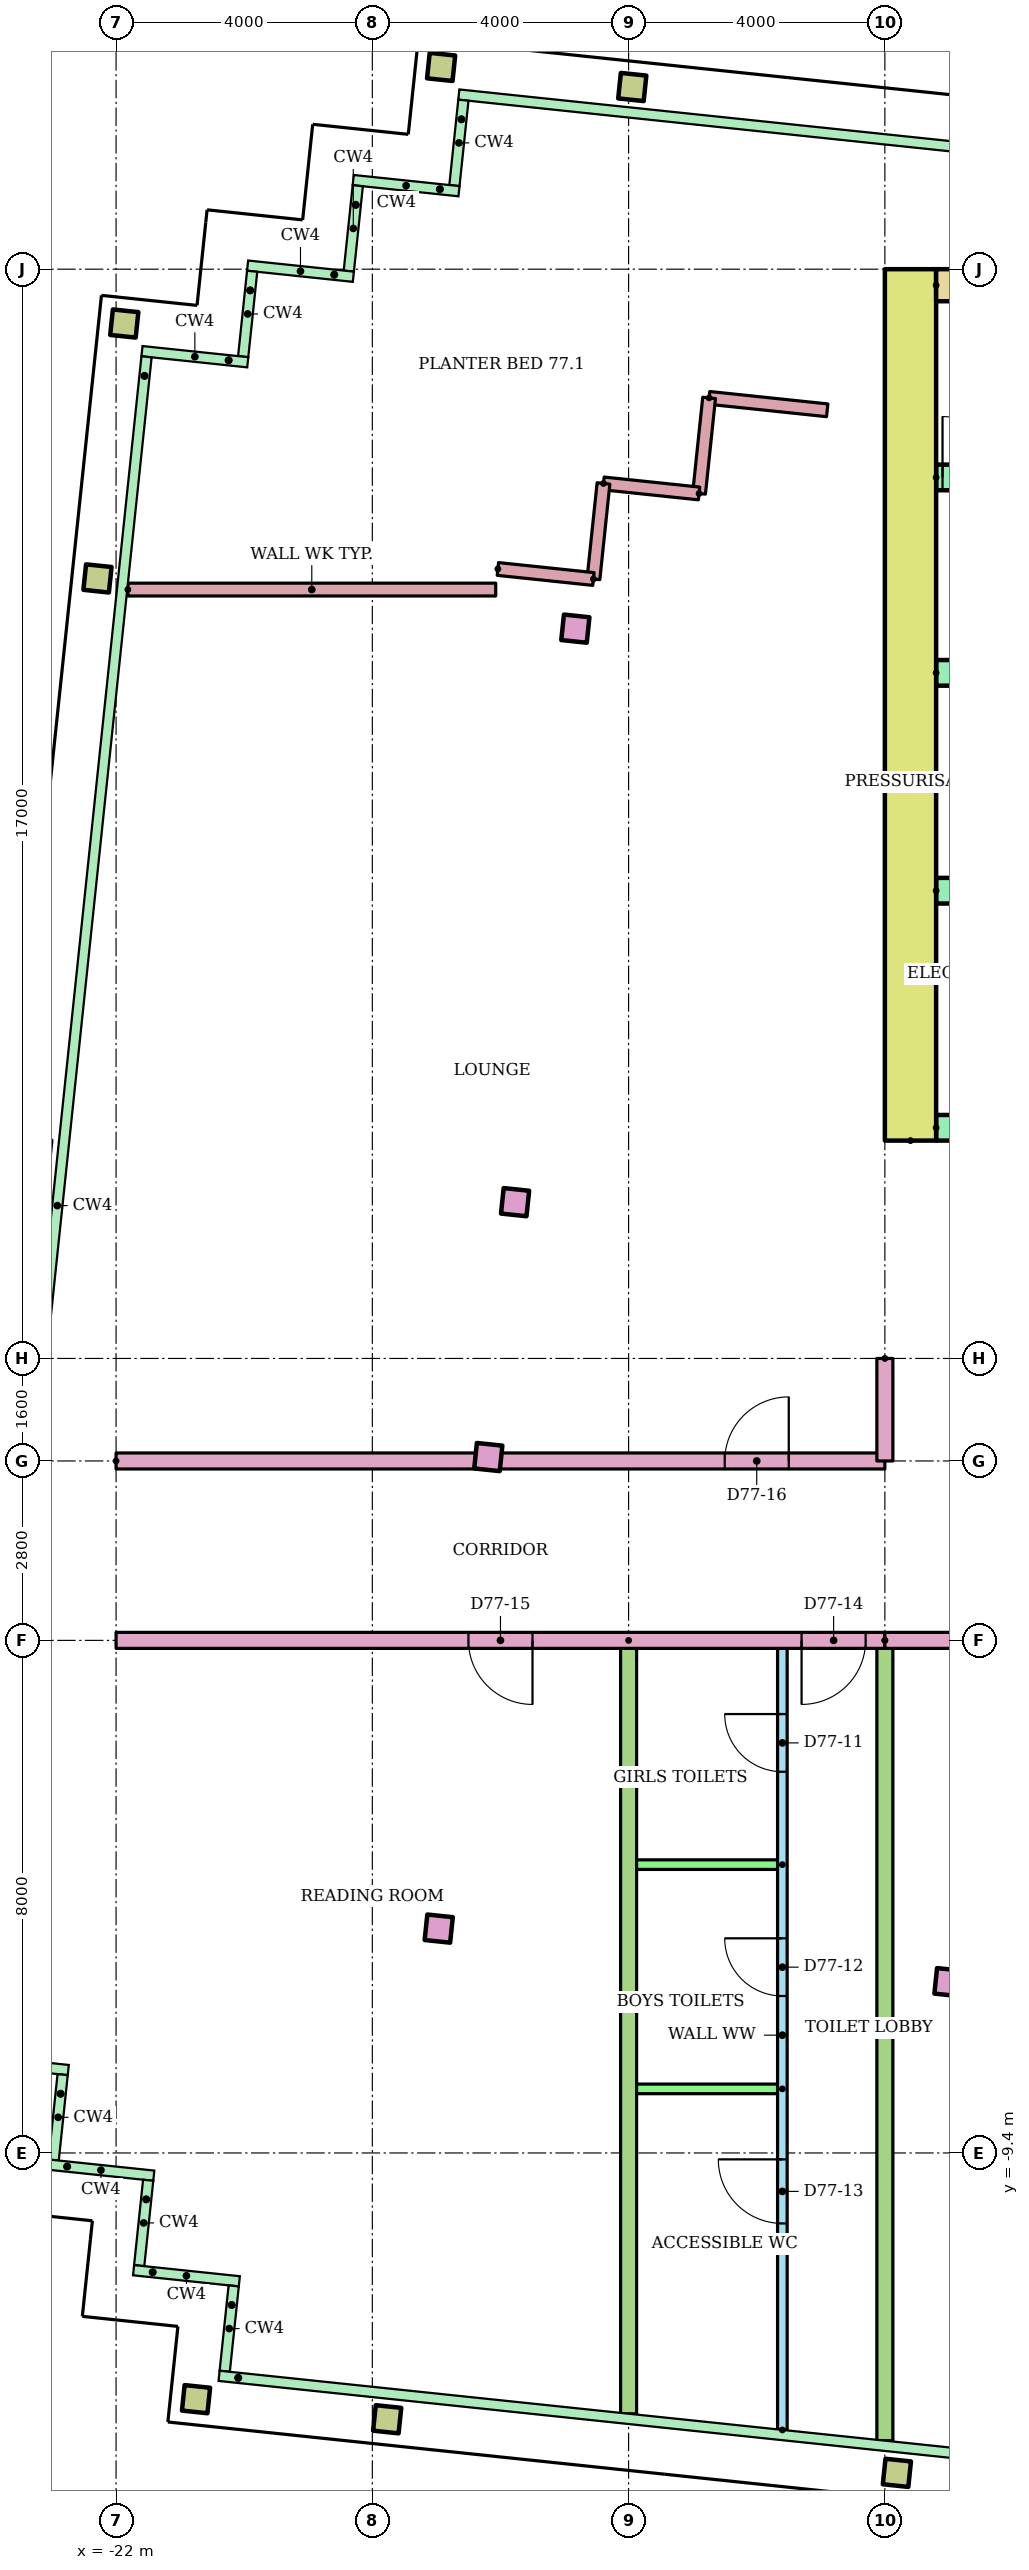
"""IFC4 building model, lengths in metres.
Left out: names, types, materials, properties, quantities, classifications, styles, units other than length and angle.
Written with IfcOpenShell. Run it as: python <this file> out.ifc"""

import sys

from ifc_helpers import new_model, si_unit, direction, frame, frame_2d, origin, origin_2d, place, context, subcontext, project, spatial, rectangle, hollow_rectangle, extrude, element, fill, save


model = new_model("IFC4")
c1 = context("Model", 3, precision=1e-05, world=origin(), true_north=direction((0.0, 1.0)))
c2 = subcontext(c1, "Body", "Model", "MODEL_VIEW")
j1 = project(units=[si_unit("LENGTHUNIT", "METRE"), si_unit("PLANEANGLEUNIT", "RADIAN")], contexts=[c1])
p1 = place(None, origin())
s1 = spatial("IfcSite", under=j1, at=p1, CompositionType="ELEMENT")
p2 = place(p1, origin())
s2 = spatial("IfcBuilding", under=s1, at=p2, CompositionType="ELEMENT")
p3 = place(p2, frame((0.0, 0.0, 298.3)))
s3 = spatial("IfcBuildingStorey", under=s2, at=p3, CompositionType="ELEMENT", Elevation=298.3)
for number, where, z_axis, x_axis in (
    (1, (-20.752, -13.243, 0.0), (0.0, 0.0, 1.0), (0.995, -0.105, 0.0)),
    (2, (-17.768, -13.556, 0.0), (0.0, 0.0, 1.0), (0.995, -0.105, 0.0)),
    (3, (-9.812, -14.392, 0.0), (0.0, 0.0, 1.0), (0.995, -0.105, 0.0)),
):
    element("IfcColumn", number, at=place(p3, frame(where, z_axis=z_axis, x_axis=x_axis)), inside=s3, PredefinedType="COLUMN", context=c2, shape_type="SweptSolid", body=[
        extrude(hollow_rectangle(XDim=0.4, YDim=0.4, WallThickness=0.02, at=origin_2d()), origin(), (0.0, 0.0, 1.0), 3.4),
    ])
for number, where, z_axis, x_axis in (
    (4, (-16.964, -5.898, 0.0), (0.0, 0.0, 1.0), (0.995, -0.105, 0.0)),
    (5, (-9.007, -6.735, 0.0), (0.0, 0.0, 1.0), (0.995, -0.105, 0.0)),
    (6, (-16.19, 1.461, 0.0), (0.0, 0.0, 1.0), (0.995, -0.105, 0.0)),
    (7, (-15.772, 5.439, 0.0), (0.0, 0.0, 1.0), (0.995, -0.105, 0.0)),
):
    element("IfcColumn", number, at=place(p3, frame(where, z_axis=z_axis, x_axis=x_axis)), inside=s3, PredefinedType="COLUMN", context=c2, shape_type="SweptSolid", body=[
        extrude(rectangle(XDim=0.4, YDim=0.4, at=origin_2d()), origin(), (0.0, 0.0, 1.0), 3.4),
    ])
p4 = place(p3, frame((-22.29, 15.174, 0.0), z_axis=(0.0, 0.0, 1.0), x_axis=(0.994521895368, -0.104528463268, 0.0)))
e8 = element("IfcColumn", 8, at=p4, inside=s3, PredefinedType="COLUMN", context=c2, shape_type="SweptSolid", body=[
    extrude(hollow_rectangle(XDim=0.4, YDim=0.4, WallThickness=0.02, at=origin_2d()), origin(), (0.0, 0.0, 1.0), 3.4),
])
p5 = place(p3, frame((-14.831, 14.39, 0.0), z_axis=(0.0, 0.0, 1.0), x_axis=(0.994521895368, -0.104528463268, 0.0)))
e9 = element("IfcColumn", 9, at=p5, inside=s3, PredefinedType="COLUMN", context=c2, shape_type="SweptSolid", body=[
    extrude(rectangle(XDim=0.4, YDim=0.4, at=origin_2d()), origin(), (0.0, 0.0, 1.0), 3.4),
])
for number, where, z_axis, x_axis in (
    (10, (-21.872, 19.152, 0.0), (0.0, 0.0, 1.0), (0.995, -0.105, 0.0)),
    (11, (-16.926, 23.157, 0.0), (0.0, 0.0, 1.0), (0.995, -0.105, 0.0)),
    (12, (-13.943, 22.843, 0.0), (0.0, 0.0, 1.0), (0.995, -0.105, 0.0)),
):
    element("IfcColumn", number, at=place(p3, frame(where, z_axis=z_axis, x_axis=x_axis)), inside=s3, PredefinedType="COLUMN", context=c2, shape_type="SweptSolid", body=[
        extrude(hollow_rectangle(XDim=0.4, YDim=0.4, WallThickness=0.02, at=origin_2d()), origin(), (0.0, 0.0, 1.0), 3.4),
    ])
p6 = place(p3, frame((-9.6, 6.4, 0.0), z_axis=(0.0, 0.0, 1.0), x_axis=(0.0, 1.0, 0.0)))
e13 = element("IfcWall", 13, at=p6, inside=s3, PredefinedType="SHEAR", context=c2, shape_type="SweptSolid", body=[
    extrude(rectangle(XDim=13.6, YDim=0.8, at=frame_2d((6.8, 0.0))), origin(), (0.0, 0.0, 1.0), 2.9),
])
p7 = place(p3, frame((-9.2, 19.75, 0.0)))
e14 = element("IfcWall", 14, at=p7, inside=s3, PredefinedType="SHEAR", context=c2, shape_type="SweptSolid", body=[
    extrude(rectangle(XDim=18.4, YDim=0.5, at=frame_2d((9.2, 0.0))), origin(), (0.0, 0.0, 1.0), 2.9),
])
p8 = place(p3, frame((-9.2, 6.6, 0.0)))
e15 = element("IfcWall", 15, at=p8, inside=s3, PredefinedType="SHEAR", context=c2, shape_type="SweptSolid", body=[
    extrude(rectangle(XDim=18.4, YDim=0.4, at=frame_2d((9.2, 0.0))), origin(), (0.0, 0.0, 1.0), 2.9),
])
p9 = place(p8, frame((8.3, 0.0, 0.0)))
e16 = element("IfcOpeningElement", 16, at=p9, cuts=e15, PredefinedType="OPENING", context=c2, shape_type="SweptSolid", body=[
    extrude(rectangle(XDim=1.8, YDim=2.1, at=frame_2d((0.9, 1.05))), frame((0.0, 0.21, 0.0), z_axis=(0.0, -1.0, 0.0), x_axis=(1.0, 0.0, 0.0)), (0.0, 0.0, 1.0), 0.42),
])
p10 = place(p8, frame((3.8, 0.0, 0.0)))
e17 = element("IfcOpeningElement", 17, at=p10, cuts=e15, PredefinedType="OPENING", context=c2, shape_type="SweptSolid", body=[
    extrude(rectangle(XDim=1.8, YDim=2.1, at=frame_2d((0.9, 1.05))), frame((0.0, 0.21, 0.0), z_axis=(0.0, -1.0, 0.0), x_axis=(1.0, 0.0, 0.0)), (0.0, 0.0, 1.0), 0.42),
])
p11 = place(p8, frame((12.8, 0.0, 0.0)))
e18 = element("IfcOpeningElement", 18, at=p11, cuts=e15, PredefinedType="OPENING", context=c2, shape_type="SweptSolid", body=[
    extrude(rectangle(XDim=1.8, YDim=2.1, at=frame_2d((0.9, 1.05))), frame((0.0, 0.21, 0.0), z_axis=(0.0, -1.0, 0.0), x_axis=(1.0, 0.0, 0.0)), (0.0, 0.0, 1.0), 0.42),
])
p12 = place(p3, frame((-9.2, 10.3, 0.0)))
e19 = element("IfcWall", 19, at=p12, inside=s3, PredefinedType="SHEAR", context=c2, shape_type="SweptSolid", body=[
    extrude(rectangle(XDim=8.0, YDim=0.4, at=frame_2d((4.0, 0.0))), origin(), (0.0, 0.0, 1.0), 2.9),
])
p13 = place(p12, frame((3.35, 0.0, 0.0)))
e20 = element("IfcOpeningElement", 20, at=p13, cuts=e19, PredefinedType="OPENING", context=c2, shape_type="SweptSolid", body=[
    extrude(rectangle(XDim=1.1, YDim=2.1, at=frame_2d((0.55, 1.05))), frame((0.0, 0.21, 0.0), z_axis=(0.0, -1.0, 0.0), x_axis=(1.0, 0.0, 0.0)), (0.0, 0.0, 1.0), 0.42),
])
p14 = place(p12, frame((6.083, 0.0, 0.0)))
e21 = element("IfcOpeningElement", 21, at=p14, cuts=e19, PredefinedType="OPENING", context=c2, shape_type="SweptSolid", body=[
    extrude(rectangle(XDim=1.1, YDim=2.1, at=frame_2d((0.55, 1.05))), frame((0.0, 0.21, 0.0), z_axis=(0.0, -1.0, 0.0), x_axis=(1.0, 0.0, 0.0)), (0.0, 0.0, 1.0), 0.42),
])
p15 = place(p12, frame((0.917, 0.0, 0.0)))
e22 = element("IfcOpeningElement", 22, at=p15, cuts=e19, PredefinedType="OPENING", context=c2, shape_type="SweptSolid", body=[
    extrude(rectangle(XDim=1.0, YDim=2.1, at=frame_2d((0.5, 1.05))), frame((0.0, 0.21, 0.0), z_axis=(0.0, -1.0, 0.0), x_axis=(1.0, 0.0, 0.0)), (0.0, 0.0, 1.0), 0.42),
])
p16 = place(p3, frame((-9.2, 13.7, 0.0)))
e23 = element("IfcWall", 23, at=p16, inside=s3, PredefinedType="SHEAR", context=c2, shape_type="SweptSolid", body=[
    extrude(rectangle(XDim=8.0, YDim=0.4, at=frame_2d((4.0, 0.0))), origin(), (0.0, 0.0, 1.0), 2.9),
])
p17 = place(p3, frame((-9.2, 16.75, 0.0)))
e24 = element("IfcWall", 24, at=p17, inside=s3, PredefinedType="SHEAR", context=c2, shape_type="SweptSolid", body=[
    extrude(rectangle(XDim=18.4, YDim=0.4, at=frame_2d((9.2, 0.0))), origin(), (0.0, 0.0, 1.0), 2.9),
])
p18 = place(p17, frame((0.1, 0.0, 0.0)))
e25 = element("IfcOpeningElement", 25, at=p18, cuts=e24, PredefinedType="OPENING", context=c2, shape_type="SweptSolid", body=[
    extrude(rectangle(XDim=0.95, YDim=2.1, at=frame_2d((0.475, 1.05))), frame((0.0, 0.21, 0.0), z_axis=(0.0, -1.0, 0.0), x_axis=(1.0, 0.0, 0.0)), (0.0, 0.0, 1.0), 0.42),
])
p19 = place(p17, frame((6.1, 0.0, 0.0)))
e26 = element("IfcOpeningElement", 26, at=p19, cuts=e24, PredefinedType="OPENING", context=c2, shape_type="SweptSolid", body=[
    extrude(rectangle(XDim=0.95, YDim=2.1, at=frame_2d((0.475, 1.05))), frame((0.0, 0.21, 0.0), z_axis=(0.0, -1.0, 0.0), x_axis=(1.0, 0.0, 0.0)), (0.0, 0.0, 1.0), 0.42),
])
p20 = place(p17, frame((12.1, 0.0, 0.0)))
e27 = element("IfcOpeningElement", 27, at=p20, cuts=e24, PredefinedType="OPENING", context=c2, shape_type="SweptSolid", body=[
    extrude(rectangle(XDim=0.95, YDim=2.1, at=frame_2d((0.475, 1.05))), frame((0.0, 0.21, 0.0), z_axis=(0.0, -1.0, 0.0), x_axis=(1.0, 0.0, 0.0)), (0.0, 0.0, 1.0), 0.42),
])
p21 = place(p3, frame((-10.0, -1.4, 0.0), z_axis=(0.0, 0.0, 1.0), x_axis=(-1.0, 0.0, 0.0)))
e28 = element("IfcWall", 28, at=p21, inside=s3, PredefinedType="PARTITIONING", context=c2, shape_type="SweptSolid", body=[
    extrude(rectangle(XDim=12.0, YDim=0.25, at=frame_2d((6.0, 0.0))), origin(), (0.0, 0.0, 1.0), 2.6),
])
p22 = place(p21, frame((0.3, 0.0, 0.0)))
e29 = element("IfcOpeningElement", 29, at=p22, cuts=e28, PredefinedType="OPENING", context=c2, shape_type="SweptSolid", body=[
    extrude(rectangle(XDim=1.0, YDim=2.1, at=frame_2d((0.5, 1.05))), frame((0.0, 0.135, 0.0), z_axis=(0.0, -1.0, 0.0), x_axis=(1.0, 0.0, 0.0)), (0.0, 0.0, 1.0), 0.27),
])
p23 = place(p21, frame((5.5, 0.0, 0.0)))
e30 = element("IfcOpeningElement", 30, at=p23, cuts=e28, PredefinedType="OPENING", context=c2, shape_type="SweptSolid", body=[
    extrude(rectangle(XDim=1.0, YDim=2.1, at=frame_2d((0.5, 1.05))), frame((0.0, 0.135, 0.0), z_axis=(0.0, -1.0, 0.0), x_axis=(1.0, 0.0, 0.0)), (0.0, 0.0, 1.0), 0.27),
])
p24 = place(p3, frame((-11.6, -13.723, 0.0), z_axis=(0.0, 0.0, 1.0), x_axis=(0.0, 1.0, 0.0)))
e31 = element("IfcWall", 31, at=p24, inside=s3, PredefinedType="PARTITIONING", context=c2, shape_type="SweptSolid", body=[
    extrude(rectangle(XDim=12.323, YDim=0.15, at=frame_2d((6.162, 0.0))), origin(), (0.0, 0.0, 1.0), 2.6),
])
p25 = place(p24, frame((10.273, 0.0, 0.0)))
e32 = element("IfcOpeningElement", 32, at=p25, cuts=e31, PredefinedType="OPENING", context=c2, shape_type="SweptSolid", body=[
    extrude(rectangle(XDim=0.9, YDim=2.1, at=frame_2d((0.45, 1.05))), frame((0.0, 0.085, 0.0), z_axis=(0.0, -1.0, 0.0), x_axis=(1.0, 0.0, 0.0)), (0.0, 0.0, 1.0), 0.17),
])
p26 = place(p24, frame((6.773, 0.0, 0.0)))
e33 = element("IfcOpeningElement", 33, at=p26, cuts=e31, PredefinedType="OPENING", context=c2, shape_type="SweptSolid", body=[
    extrude(rectangle(XDim=0.9, YDim=2.1, at=frame_2d((0.45, 1.05))), frame((0.0, 0.085, 0.0), z_axis=(0.0, -1.0, 0.0), x_axis=(1.0, 0.0, 0.0)), (0.0, 0.0, 1.0), 0.17),
])
p27 = place(p24, frame((3.223, 0.0, 0.0)))
e34 = element("IfcOpeningElement", 34, at=p27, cuts=e31, PredefinedType="OPENING", context=c2, shape_type="SweptSolid", body=[
    extrude(rectangle(XDim=1.0, YDim=2.1, at=frame_2d((0.5, 1.05))), frame((0.0, 0.085, 0.0), z_axis=(0.0, -1.0, 0.0), x_axis=(1.0, 0.0, 0.0)), (0.0, 0.0, 1.0), 0.17),
])
for number, where, z_axis, x_axis in (
    (35, (-11.6, -4.9, 0.0), (0.0, 0.0, 1.0), (-1.0, 0.0, 0.0)),
    (36, (-11.6, -8.4, 0.0), (0.0, 0.0, 1.0), (-1.0, 0.0, 0.0)),
):
    element("IfcWall", number, at=place(p3, frame(where, z_axis=z_axis, x_axis=x_axis)), inside=s3, PredefinedType="PARTITIONING", context=c2, shape_type="SweptSolid", body=[
        extrude(rectangle(XDim=2.4, YDim=0.15, at=frame_2d((1.2, 0.0))), origin(), (0.0, 0.0, 1.0), 2.6),
    ])
p28 = place(p3, frame((-14.0, -1.4, 0.0), z_axis=(0.0, 0.0, 1.0), x_axis=(0.0, -1.0, 0.0)))
e37 = element("IfcWall", 37, at=p28, inside=s3, PredefinedType="PARTITIONING", context=c2, shape_type="SweptSolid", body=[
    extrude(rectangle(XDim=12.071, YDim=0.25, at=frame_2d((6.035, 0.0))), origin(), (0.0, 0.0, 1.0), 2.6),
])
p29 = place(p3, frame((-10.0, -1.4, 0.0), z_axis=(0.0, 0.0, 1.0), x_axis=(0.0, -1.0, 0.0)))
e38 = element("IfcWall", 38, at=p29, inside=s3, PredefinedType="PARTITIONING", context=c2, shape_type="SweptSolid", body=[
    extrude(rectangle(XDim=12.491, YDim=0.25, at=frame_2d((6.246, 0.0))), origin(), (0.0, 0.0, 1.0), 2.6),
])
p30 = place(p3, frame((-22.0, 1.4, 0.0)))
e39 = element("IfcWall", 39, at=p30, inside=s3, PredefinedType="PARTITIONING", context=c2, shape_type="SweptSolid", body=[
    extrude(rectangle(XDim=12.0, YDim=0.25, at=frame_2d((6.0, 0.0))), origin(), (0.0, 0.0, 1.0), 2.6),
])
p31 = place(p30, frame((9.5, 0.0, 0.0)))
e40 = element("IfcOpeningElement", 40, at=p31, cuts=e39, PredefinedType="OPENING", context=c2, shape_type="SweptSolid", body=[
    extrude(rectangle(XDim=1.0, YDim=2.1, at=frame_2d((0.5, 1.05))), frame((0.0, 0.135, 0.0), z_axis=(0.0, -1.0, 0.0), x_axis=(1.0, 0.0, 0.0)), (0.0, 0.0, 1.0), 0.27),
])
p32 = place(p3, frame((10.0, -1.4, 0.0), z_axis=(0.0, 0.0, 1.0), x_axis=(-1.0, 0.0, 0.0)))
e41 = element("IfcWall", 41, at=p32, inside=s3, PredefinedType="PARTITIONING", context=c2, shape_type="SweptSolid", body=[
    extrude(rectangle(XDim=20.0, YDim=0.25, at=frame_2d((10.0, 0.0))), origin(), (0.0, 0.0, 1.0), 2.6),
])
p33 = place(p32, frame((13.5, 0.0, 0.0)))
e42 = element("IfcOpeningElement", 42, at=p33, cuts=e41, PredefinedType="OPENING", context=c2, shape_type="SweptSolid", body=[
    extrude(rectangle(XDim=1.0, YDim=2.1, at=frame_2d((0.5, 1.05))), frame((0.0, 0.135, 0.0), z_axis=(0.0, -1.0, 0.0), x_axis=(1.0, 0.0, 0.0)), (0.0, 0.0, 1.0), 0.27),
])
p34 = place(p32, frame((0.988, 0.0, 0.0)))
e43 = element("IfcOpeningElement", 43, at=p34, cuts=e41, PredefinedType="OPENING", context=c2, shape_type="SweptSolid", body=[
    extrude(rectangle(XDim=1.0, YDim=2.1, at=frame_2d((0.5, 1.05))), frame((0.0, 0.135, 0.0), z_axis=(0.0, -1.0, 0.0), x_axis=(1.0, 0.0, 0.0)), (0.0, 0.0, 1.0), 0.27),
])
p35 = place(p3, frame((-10.0, 3.0, 0.0), z_axis=(0.0, 0.0, 1.0), x_axis=(0.0, -1.0, 0.0)))
e44 = element("IfcWall", 44, at=p35, inside=s3, PredefinedType="PARTITIONING", context=c2, shape_type="SweptSolid", body=[
    extrude(rectangle(XDim=1.6, YDim=0.25, at=frame_2d((0.8, 0.0))), origin(), (0.0, 0.0, 1.0), 2.6),
])
p36 = place(p3, frame((-12.743, 17.991, 0.0), z_axis=(0.0, 0.0, 1.0), x_axis=(0.994516993757, -0.104575088471, 0.0)))
e45 = element("IfcWall", 45, at=p36, inside=s3, PredefinedType="PARTITIONING", context=c2, shape_type="SweptSolid", body=[
    extrude(rectangle(XDim=1.854, YDim=0.2, at=frame_2d((0.927, 0.0))), origin(), (0.0, 0.0, 1.0), 0.9),
])
p37 = place(p3, frame((-12.9, 16.5, 0.0), z_axis=(0.0, 0.0, 1.0), x_axis=(0.104481464157, 0.994526834051, 0.0)))
e46 = element("IfcWall", 46, at=p37, inside=s3, PredefinedType="PARTITIONING", context=c2, shape_type="SweptSolid", body=[
    extrude(rectangle(XDim=1.5, YDim=0.2, at=frame_2d((0.75, 0.0))), origin(), (0.0, 0.0, 1.0), 0.9),
])
p38 = place(p3, frame((-14.392, 16.656, 0.0), z_axis=(0.0, 0.0, 1.0), x_axis=(0.994508128223, -0.104659366031, 0.0)))
e47 = element("IfcWall", 47, at=p38, inside=s3, PredefinedType="PARTITIONING", context=c2, shape_type="SweptSolid", body=[
    extrude(rectangle(XDim=1.5, YDim=0.2, at=frame_2d((0.75, 0.0))), origin(), (0.0, 0.0, 1.0), 0.9),
])
p39 = place(p3, frame((-14.549, 15.165, 0.0), z_axis=(0.0, 0.0, 1.0), x_axis=(0.104481464157, 0.994526834051, 0.0)))
e48 = element("IfcWall", 48, at=p39, inside=s3, PredefinedType="PARTITIONING", context=c2, shape_type="SweptSolid", body=[
    extrude(rectangle(XDim=1.5, YDim=0.2, at=frame_2d((0.75, 0.0))), origin(), (0.0, 0.0, 1.0), 0.9),
])
p40 = place(p3, frame((-16.04, 15.321, 0.0), z_axis=(0.0, 0.0, 1.0), x_axis=(0.994525057048, -0.104498377516, 0.0)))
e49 = element("IfcWall", 49, at=p40, inside=s3, PredefinedType="PARTITIONING", context=c2, shape_type="SweptSolid", body=[
    extrude(rectangle(XDim=1.5, YDim=0.2, at=frame_2d((0.75, 0.0))), origin(), (0.0, 0.0, 1.0), 0.9),
])
p41 = place(p3, frame((-21.816, 15.0, 0.0)))
e50 = element("IfcWall", 50, at=p41, inside=s3, PredefinedType="PARTITIONING", context=c2, shape_type="SweptSolid", body=[
    extrude(rectangle(XDim=5.742, YDim=0.2, at=frame_2d((2.871, 0.0))), origin(), (0.0, 0.0, 1.0), 0.9),
])
p42 = place(p18, origin())
e51 = element("IfcDoor", 51, at=p42, inside=s3, OperationType="SINGLE_SWING_LEFT", PredefinedType="DOOR", context=c2, shape_type="SweptSolid", body=[
    extrude(rectangle(XDim=0.95, YDim=2.1, at=frame_2d((0.475, 1.05))), frame((0.0, 0.025, 0.0), z_axis=(0.0, -1.0, 0.0), x_axis=(1.0, 0.0, 0.0)), (0.0, 0.0, 1.0), 0.05),
])
fill(e25, e51)
p43 = place(p25, origin())
e52 = element("IfcDoor", 52, at=p43, inside=s3, OperationType="SINGLE_SWING_RIGHT", PredefinedType="DOOR", context=c2, shape_type="SweptSolid", body=[
    extrude(rectangle(XDim=0.9, YDim=2.1, at=frame_2d((0.45, 1.05))), frame((0.0, 0.025, 0.0), z_axis=(0.0, -1.0, 0.0), x_axis=(1.0, 0.0, 0.0)), (0.0, 0.0, 1.0), 0.05),
])
fill(e32, e52)
p44 = place(p26, origin())
e53 = element("IfcDoor", 53, at=p44, inside=s3, OperationType="SINGLE_SWING_RIGHT", PredefinedType="DOOR", context=c2, shape_type="SweptSolid", body=[
    extrude(rectangle(XDim=0.9, YDim=2.1, at=frame_2d((0.45, 1.05))), frame((0.0, 0.025, 0.0), z_axis=(0.0, -1.0, 0.0), x_axis=(1.0, 0.0, 0.0)), (0.0, 0.0, 1.0), 0.05),
])
fill(e33, e53)
p45 = place(p27, origin())
e54 = element("IfcDoor", 54, at=p45, inside=s3, OperationType="SINGLE_SWING_RIGHT", PredefinedType="DOOR", context=c2, shape_type="SweptSolid", body=[
    extrude(rectangle(XDim=1.0, YDim=2.1, at=frame_2d((0.5, 1.05))), frame((0.0, 0.025, 0.0), z_axis=(0.0, -1.0, 0.0), x_axis=(1.0, 0.0, 0.0)), (0.0, 0.0, 1.0), 0.05),
])
fill(e34, e54)
p46 = place(p22, origin())
e55 = element("IfcDoor", 55, at=p46, inside=s3, OperationType="SINGLE_SWING_RIGHT", PredefinedType="DOOR", context=c2, shape_type="SweptSolid", body=[
    extrude(rectangle(XDim=1.0, YDim=2.1, at=frame_2d((0.5, 1.05))), frame((0.0, 0.025, 0.0), z_axis=(0.0, -1.0, 0.0), x_axis=(1.0, 0.0, 0.0)), (0.0, 0.0, 1.0), 0.05),
])
fill(e29, e55)
p47 = place(p23, origin())
e56 = element("IfcDoor", 56, at=p47, inside=s3, OperationType="SINGLE_SWING_LEFT", PredefinedType="DOOR", context=c2, shape_type="SweptSolid", body=[
    extrude(rectangle(XDim=1.0, YDim=2.1, at=frame_2d((0.5, 1.05))), frame((0.0, 0.025, 0.0), z_axis=(0.0, -1.0, 0.0), x_axis=(1.0, 0.0, 0.0)), (0.0, 0.0, 1.0), 0.05),
])
fill(e30, e56)
p48 = place(p31, origin())
e57 = element("IfcDoor", 57, at=p48, inside=s3, OperationType="SINGLE_SWING_RIGHT", PredefinedType="DOOR", context=c2, shape_type="SweptSolid", body=[
    extrude(rectangle(XDim=1.0, YDim=2.1, at=frame_2d((0.5, 1.05))), frame((0.0, 0.025, 0.0), z_axis=(0.0, -1.0, 0.0), x_axis=(1.0, 0.0, 0.0)), (0.0, 0.0, 1.0), 0.05),
])
fill(e40, e57)
save(model, sys.argv[1])
